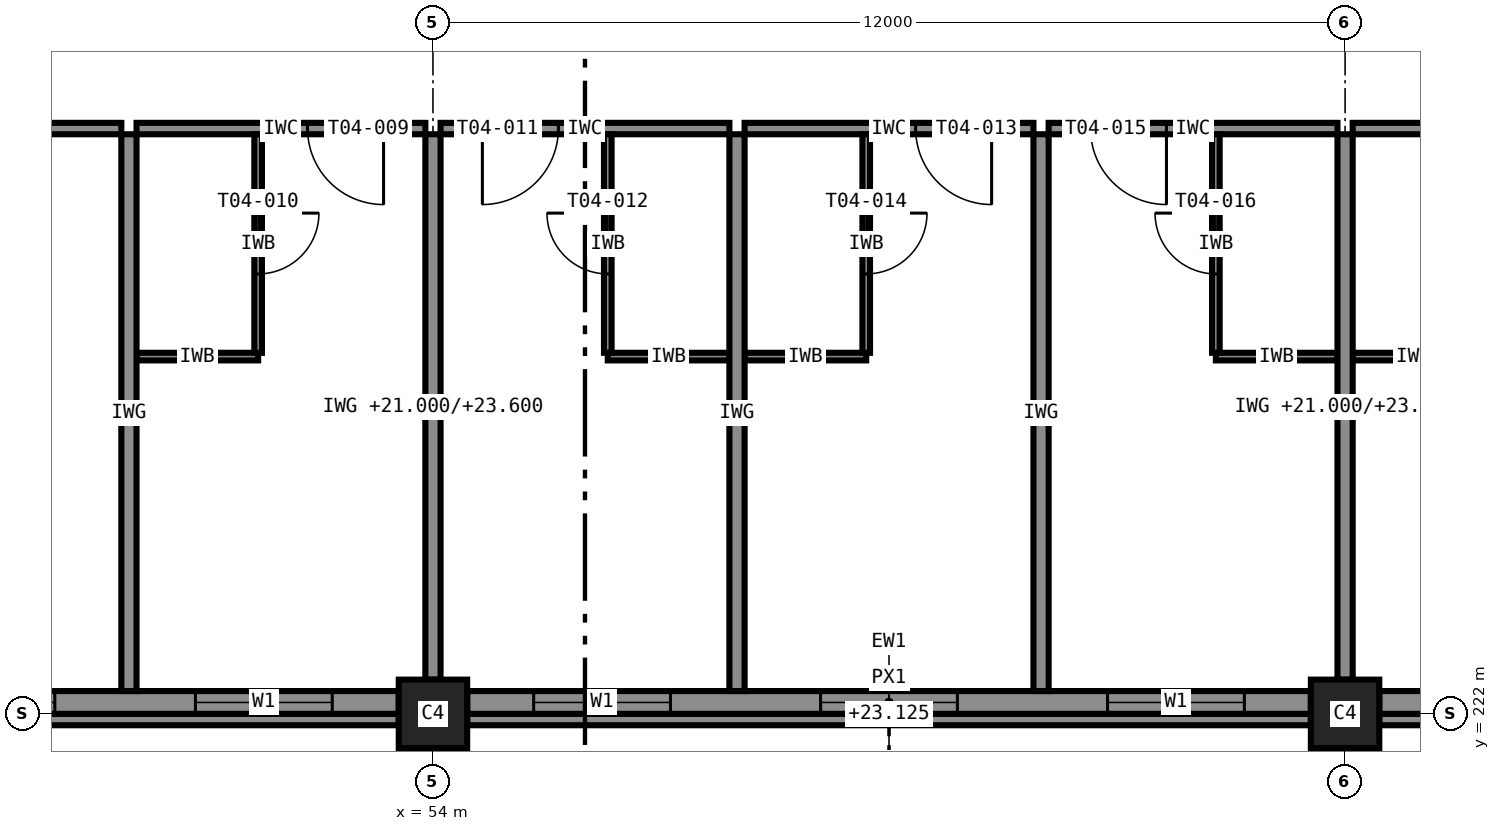
"""IFC4 building model, lengths in metres.
Left out: names, types, materials, properties, quantities, classifications, styles, units other than length and angle.
Written with IfcOpenShell. Run it as: python <this file> out.ifc"""

import sys

from ifc_helpers import new_model, si_unit, direction, frame, frame_2d, origin, origin_2d, place, context, subcontext, project, spatial, rectangle, extrude, element, fill, save


model = new_model("IFC4")
c1 = context("Model", 3, precision=1e-05, world=origin(), true_north=direction((0.0, 1.0)))
c2 = subcontext(c1, "Body", "Model", "MODEL_VIEW")
j1 = project(units=[si_unit("LENGTHUNIT", "METRE"), si_unit("PLANEANGLEUNIT", "RADIAN")], contexts=[c1])
p1 = place(None, origin())
s1 = spatial("IfcSite", under=j1, at=p1, CompositionType="ELEMENT")
p2 = place(p1, origin())
s2 = spatial("IfcBuilding", under=s1, at=p2, CompositionType="ELEMENT")
p3 = place(p2, frame((0.0, 0.0, 21.0)))
s3 = spatial("IfcBuildingStorey", under=s2, at=p3, CompositionType="ELEMENT", Elevation=21.0)
for number, where, z_axis, x_axis in (
    (1, (54.0, 222.0, 0.0), (0.0, 0.0, 1.0), (1.0, 0.0, 0.0)),
    (2, (66.0, 222.0, 0.0), (0.0, 0.0, 1.0), (1.0, 0.0, 0.0)),
):
    element("IfcColumn", number, at=place(p3, frame(where, z_axis=z_axis, x_axis=x_axis)), inside=s3, PredefinedType="COLUMN", context=c2, shape_type="SweptSolid", body=[
        extrude(rectangle(XDim=0.9, YDim=0.9, at=origin_2d()), origin(), (0.0, 0.0, 1.0), 3.6),
    ])
p4 = place(p3, frame((42.45, 222.15, 0.0), z_axis=(0.0, 0.0, 1.0), x_axis=(1.0, 0.0, 0.0)))
e3 = element("IfcWall", 3, at=p4, inside=s3, PredefinedType="STANDARD", context=c2, shape_type="SweptSolid", body=[
    extrude(rectangle(XDim=11.1, YDim=0.3, at=frame_2d((5.55, 0.0))), origin(), (0.0, 0.0, 1.0), 2.6),
])
p5 = place(p4, frame((1.025, 0.0, 0.85)))
e4 = element("IfcOpeningElement", 4, at=p5, cuts=e3, PredefinedType="OPENING", context=c2, shape_type="SweptSolid", body=[
    extrude(rectangle(XDim=1.8, YDim=1.75, at=frame_2d((0.9, 0.875))), frame((0.0, 0.16, 0.0), z_axis=(0.0, -1.0, 0.0), x_axis=(1.0, 0.0, 0.0)), (0.0, 0.0, 1.0), 0.32),
])
p6 = place(p4, frame((4.775, 0.0, 0.85)))
e5 = element("IfcOpeningElement", 5, at=p6, cuts=e3, PredefinedType="OPENING", context=c2, shape_type="SweptSolid", body=[
    extrude(rectangle(XDim=1.8, YDim=1.75, at=frame_2d((0.9, 0.875))), frame((0.0, 0.16, 0.0), z_axis=(0.0, -1.0, 0.0), x_axis=(1.0, 0.0, 0.0)), (0.0, 0.0, 1.0), 0.32),
])
p7 = place(p4, frame((8.425, 0.0, 0.85)))
e6 = element("IfcOpeningElement", 6, at=p7, cuts=e3, PredefinedType="OPENING", context=c2, shape_type="SweptSolid", body=[
    extrude(rectangle(XDim=1.8, YDim=1.75, at=frame_2d((0.9, 0.875))), frame((0.0, 0.16, 0.0), z_axis=(0.0, -1.0, 0.0), x_axis=(1.0, 0.0, 0.0)), (0.0, 0.0, 1.0), 0.32),
])
p8 = place(p3, frame((54.45, 222.15, 0.0), z_axis=(0.0, 0.0, 1.0), x_axis=(1.0, 0.0, 0.0)))
e7 = element("IfcWall", 7, at=p8, inside=s3, PredefinedType="STANDARD", context=c2, shape_type="SweptSolid", body=[
    extrude(rectangle(XDim=11.1, YDim=0.3, at=frame_2d((5.55, 0.0))), origin(), (0.0, 0.0, 1.0), 2.6),
])
p9 = place(p8, frame((0.875, 0.0, 0.85)))
e8 = element("IfcOpeningElement", 8, at=p9, cuts=e7, PredefinedType="OPENING", context=c2, shape_type="SweptSolid", body=[
    extrude(rectangle(XDim=1.8, YDim=1.75, at=frame_2d((0.9, 0.875))), frame((0.0, 0.16, 0.0), z_axis=(0.0, -1.0, 0.0), x_axis=(1.0, 0.0, 0.0)), (0.0, 0.0, 1.0), 0.32),
])
p10 = place(p8, frame((4.65, 0.0, 0.85)))
e9 = element("IfcOpeningElement", 9, at=p10, cuts=e7, PredefinedType="OPENING", context=c2, shape_type="SweptSolid", body=[
    extrude(rectangle(XDim=1.8, YDim=1.75, at=frame_2d((0.9, 0.875))), frame((0.0, 0.16, 0.0), z_axis=(0.0, -1.0, 0.0), x_axis=(1.0, 0.0, 0.0)), (0.0, 0.0, 1.0), 0.32),
])
p11 = place(p8, frame((8.425, 0.0, 0.85)))
e10 = element("IfcOpeningElement", 10, at=p11, cuts=e7, PredefinedType="OPENING", context=c2, shape_type="SweptSolid", body=[
    extrude(rectangle(XDim=1.8, YDim=1.75, at=frame_2d((0.9, 0.875))), frame((0.0, 0.16, 0.0), z_axis=(0.0, -1.0, 0.0), x_axis=(1.0, 0.0, 0.0)), (0.0, 0.0, 1.0), 0.32),
])
p12 = place(p3, frame((66.45, 222.15, 0.0), z_axis=(0.0, 0.0, 1.0), x_axis=(1.0, 0.0, 0.0)))
e11 = element("IfcWall", 11, at=p12, inside=s3, PredefinedType="STANDARD", context=c2, shape_type="SweptSolid", body=[
    extrude(rectangle(XDim=11.1, YDim=0.3, at=frame_2d((5.55, 0.0))), origin(), (0.0, 0.0, 1.0), 2.6),
])
p13 = place(p12, frame((0.875, 0.0, 0.85)))
e12 = element("IfcOpeningElement", 12, at=p13, cuts=e11, PredefinedType="OPENING", context=c2, shape_type="SweptSolid", body=[
    extrude(rectangle(XDim=1.8, YDim=1.75, at=frame_2d((0.9, 0.875))), frame((0.0, 0.16, 0.0), z_axis=(0.0, -1.0, 0.0), x_axis=(1.0, 0.0, 0.0)), (0.0, 0.0, 1.0), 0.32),
])
p14 = place(p12, frame((4.65, 0.0, 0.85)))
e13 = element("IfcOpeningElement", 13, at=p14, cuts=e11, PredefinedType="OPENING", context=c2, shape_type="SweptSolid", body=[
    extrude(rectangle(XDim=1.8, YDim=1.75, at=frame_2d((0.9, 0.875))), frame((0.0, 0.16, 0.0), z_axis=(0.0, -1.0, 0.0), x_axis=(1.0, 0.0, 0.0)), (0.0, 0.0, 1.0), 0.32),
])
p15 = place(p12, frame((8.425, 0.0, 0.85)))
e14 = element("IfcOpeningElement", 14, at=p15, cuts=e11, PredefinedType="OPENING", context=c2, shape_type="SweptSolid", body=[
    extrude(rectangle(XDim=1.8, YDim=1.75, at=frame_2d((0.9, 0.875))), frame((0.0, 0.16, 0.0), z_axis=(0.0, -1.0, 0.0), x_axis=(1.0, 0.0, 0.0)), (0.0, 0.0, 1.0), 0.32),
])
for number, where, z_axis, x_axis in (
    (15, (42.45, 221.925, 3.4), (0.0, 0.0, 1.0), (1.0, 0.0, 0.0)),
    (16, (54.45, 221.925, 3.4), (0.0, 0.0, 1.0), (1.0, 0.0, 0.0)),
    (17, (66.45, 221.925, 3.4), (0.0, 0.0, 1.0), (1.0, 0.0, 0.0)),
):
    element("IfcWall", number, at=place(p3, frame(where, z_axis=z_axis, x_axis=x_axis)), inside=s3, PredefinedType="STANDARD", context=c2, shape_type="SweptSolid", body=[
        extrude(rectangle(XDim=11.1, YDim=0.15, at=frame_2d((5.55, 0.0))), origin(), (0.0, 0.0, 1.0), 0.2),
    ])
p16 = place(p3, frame((49.9, 229.7, 0.0), z_axis=(0.0, 0.0, 1.0), x_axis=(-1.0, 0.0, 0.0)))
e18 = element("IfcWall", 18, at=p16, inside=s3, PredefinedType="PARTITIONING", context=c2, shape_type="SweptSolid", body=[
    extrude(rectangle(XDim=7.7, YDim=0.15, at=frame_2d((3.85, 0.0))), origin(), (0.0, 0.0, 1.0), 3.4),
])
p17 = place(p16, frame((3.15, 0.0, 0.0)))
e19 = element("IfcOpeningElement", 19, at=p17, cuts=e18, PredefinedType="OPENING", context=c2, shape_type="SweptSolid", body=[
    extrude(rectangle(XDim=1.0, YDim=2.1, at=frame_2d((0.5, 1.05))), frame((0.0, 0.085, 0.0), z_axis=(0.0, -1.0, 0.0), x_axis=(1.0, 0.0, 0.0)), (0.0, 0.0, 1.0), 0.17),
])
p18 = place(p3, frame((53.9, 229.7, 0.0), z_axis=(0.0, 0.0, 1.0), x_axis=(-1.0, 0.0, 0.0)))
e20 = element("IfcWall", 20, at=p18, inside=s3, PredefinedType="PARTITIONING", context=c2, shape_type="SweptSolid", body=[
    extrude(rectangle(XDim=3.8, YDim=0.15, at=frame_2d((1.9, 0.0))), origin(), (0.0, 0.0, 1.0), 3.4),
])
p19 = place(p18, frame((0.55, 0.0, 0.0)))
e21 = element("IfcOpeningElement", 21, at=p19, cuts=e20, PredefinedType="OPENING", context=c2, shape_type="SweptSolid", body=[
    extrude(rectangle(XDim=1.0, YDim=2.1, at=frame_2d((0.5, 1.05))), frame((0.0, 0.085, 0.0), z_axis=(0.0, -1.0, 0.0), x_axis=(1.0, 0.0, 0.0)), (0.0, 0.0, 1.0), 0.17),
])
p20 = place(p3, frame((50.1, 226.7, 0.0), z_axis=(0.0, 0.0, 1.0), x_axis=(1.0, 0.0, 0.0)))
e22 = element("IfcWall", 22, at=p20, inside=s3, PredefinedType="PARTITIONING", context=c2, shape_type="SweptSolid", body=[
    extrude(rectangle(XDim=1.6, YDim=0.1, at=frame_2d((0.8, 0.0))), origin(), (0.0, 0.0, 1.0), 3.4),
])
p21 = place(p3, frame((51.7, 229.625, 0.0), z_axis=(0.0, 0.0, 1.0), x_axis=(0.0, -1.0, 0.0)))
e23 = element("IfcWall", 23, at=p21, inside=s3, PredefinedType="PARTITIONING", context=c2, shape_type="SweptSolid", body=[
    extrude(rectangle(XDim=2.875, YDim=0.1, at=frame_2d((1.438, 0.0))), origin(), (0.0, 0.0, 1.0), 3.4),
])
p22 = place(p21, frame((1.038, 0.0, 0.0)))
e24 = element("IfcOpeningElement", 24, at=p22, cuts=e23, PredefinedType="OPENING", context=c2, shape_type="SweptSolid", body=[
    extrude(rectangle(XDim=0.8, YDim=2.1, at=frame_2d((0.4, 1.05))), frame((0.0, 0.06, 0.0), z_axis=(0.0, -1.0, 0.0), x_axis=(1.0, 0.0, 0.0)), (0.0, 0.0, 1.0), 0.12),
])
p23 = place(p3, frame((57.9, 229.7, 0.0), z_axis=(0.0, 0.0, 1.0), x_axis=(-1.0, 0.0, 0.0)))
e25 = element("IfcWall", 25, at=p23, inside=s3, PredefinedType="PARTITIONING", context=c2, shape_type="SweptSolid", body=[
    extrude(rectangle(XDim=3.8, YDim=0.15, at=frame_2d((1.9, 0.0))), origin(), (0.0, 0.0, 1.0), 3.4),
])
p24 = place(p23, frame((2.25, 0.0, 0.0)))
e26 = element("IfcOpeningElement", 26, at=p24, cuts=e25, PredefinedType="OPENING", context=c2, shape_type="SweptSolid", body=[
    extrude(rectangle(XDim=1.0, YDim=2.1, at=frame_2d((0.5, 1.05))), frame((0.0, 0.085, 0.0), z_axis=(0.0, -1.0, 0.0), x_axis=(1.0, 0.0, 0.0)), (0.0, 0.0, 1.0), 0.17),
])
p25 = place(p3, frame((56.3, 226.7, 0.0), z_axis=(0.0, 0.0, 1.0), x_axis=(1.0, 0.0, 0.0)))
e27 = element("IfcWall", 27, at=p25, inside=s3, PredefinedType="PARTITIONING", context=c2, shape_type="SweptSolid", body=[
    extrude(rectangle(XDim=1.6, YDim=0.1, at=frame_2d((0.8, 0.0))), origin(), (0.0, 0.0, 1.0), 3.4),
])
p26 = place(p3, frame((56.3, 226.75, 0.0), z_axis=(0.0, 0.0, 1.0), x_axis=(0.0, 1.0, 0.0)))
e28 = element("IfcWall", 28, at=p26, inside=s3, PredefinedType="PARTITIONING", context=c2, shape_type="SweptSolid", body=[
    extrude(rectangle(XDim=2.875, YDim=0.1, at=frame_2d((1.438, 0.0))), origin(), (0.0, 0.0, 1.0), 3.4),
])
p27 = place(p26, frame((1.038, 0.0, 0.0)))
e29 = element("IfcOpeningElement", 29, at=p27, cuts=e28, PredefinedType="OPENING", context=c2, shape_type="SweptSolid", body=[
    extrude(rectangle(XDim=0.8, YDim=2.1, at=frame_2d((0.4, 1.05))), frame((0.0, 0.06, 0.0), z_axis=(0.0, -1.0, 0.0), x_axis=(1.0, 0.0, 0.0)), (0.0, 0.0, 1.0), 0.12),
])
p28 = place(p3, frame((61.9, 229.7, 0.0), z_axis=(0.0, 0.0, 1.0), x_axis=(-1.0, 0.0, 0.0)))
e30 = element("IfcWall", 30, at=p28, inside=s3, PredefinedType="PARTITIONING", context=c2, shape_type="SweptSolid", body=[
    extrude(rectangle(XDim=3.8, YDim=0.15, at=frame_2d((1.9, 0.0))), origin(), (0.0, 0.0, 1.0), 3.4),
])
p29 = place(p28, frame((0.55, 0.0, 0.0)))
e31 = element("IfcOpeningElement", 31, at=p29, cuts=e30, PredefinedType="OPENING", context=c2, shape_type="SweptSolid", body=[
    extrude(rectangle(XDim=1.0, YDim=2.1, at=frame_2d((0.5, 1.05))), frame((0.0, 0.085, 0.0), z_axis=(0.0, -1.0, 0.0), x_axis=(1.0, 0.0, 0.0)), (0.0, 0.0, 1.0), 0.17),
])
p30 = place(p3, frame((58.1, 226.7, 0.0), z_axis=(0.0, 0.0, 1.0), x_axis=(1.0, 0.0, 0.0)))
e32 = element("IfcWall", 32, at=p30, inside=s3, PredefinedType="PARTITIONING", context=c2, shape_type="SweptSolid", body=[
    extrude(rectangle(XDim=1.6, YDim=0.1, at=frame_2d((0.8, 0.0))), origin(), (0.0, 0.0, 1.0), 3.4),
])
p31 = place(p3, frame((59.7, 229.625, 0.0), z_axis=(0.0, 0.0, 1.0), x_axis=(0.0, -1.0, 0.0)))
e33 = element("IfcWall", 33, at=p31, inside=s3, PredefinedType="PARTITIONING", context=c2, shape_type="SweptSolid", body=[
    extrude(rectangle(XDim=2.875, YDim=0.1, at=frame_2d((1.438, 0.0))), origin(), (0.0, 0.0, 1.0), 3.4),
])
p32 = place(p31, frame((1.038, 0.0, 0.0)))
e34 = element("IfcOpeningElement", 34, at=p32, cuts=e33, PredefinedType="OPENING", context=c2, shape_type="SweptSolid", body=[
    extrude(rectangle(XDim=0.8, YDim=2.1, at=frame_2d((0.4, 1.05))), frame((0.0, 0.06, 0.0), z_axis=(0.0, -1.0, 0.0), x_axis=(1.0, 0.0, 0.0)), (0.0, 0.0, 1.0), 0.12),
])
p33 = place(p3, frame((65.9, 229.7, 0.0), z_axis=(0.0, 0.0, 1.0), x_axis=(-1.0, 0.0, 0.0)))
e35 = element("IfcWall", 35, at=p33, inside=s3, PredefinedType="PARTITIONING", context=c2, shape_type="SweptSolid", body=[
    extrude(rectangle(XDim=3.8, YDim=0.15, at=frame_2d((1.9, 0.0))), origin(), (0.0, 0.0, 1.0), 3.4),
])
p34 = place(p33, frame((2.25, 0.0, 0.0)))
e36 = element("IfcOpeningElement", 36, at=p34, cuts=e35, PredefinedType="OPENING", context=c2, shape_type="SweptSolid", body=[
    extrude(rectangle(XDim=1.0, YDim=2.1, at=frame_2d((0.5, 1.05))), frame((0.0, 0.085, 0.0), z_axis=(0.0, -1.0, 0.0), x_axis=(1.0, 0.0, 0.0)), (0.0, 0.0, 1.0), 0.17),
])
p35 = place(p3, frame((64.3, 226.7, 0.0), z_axis=(0.0, 0.0, 1.0), x_axis=(1.0, 0.0, 0.0)))
e37 = element("IfcWall", 37, at=p35, inside=s3, PredefinedType="PARTITIONING", context=c2, shape_type="SweptSolid", body=[
    extrude(rectangle(XDim=1.6, YDim=0.1, at=frame_2d((0.8, 0.0))), origin(), (0.0, 0.0, 1.0), 3.4),
])
p36 = place(p3, frame((64.3, 226.75, 0.0), z_axis=(0.0, 0.0, 1.0), x_axis=(0.0, 1.0, 0.0)))
e38 = element("IfcWall", 38, at=p36, inside=s3, PredefinedType="PARTITIONING", context=c2, shape_type="SweptSolid", body=[
    extrude(rectangle(XDim=2.875, YDim=0.1, at=frame_2d((1.438, 0.0))), origin(), (0.0, 0.0, 1.0), 3.4),
])
p37 = place(p36, frame((1.038, 0.0, 0.0)))
e39 = element("IfcOpeningElement", 39, at=p37, cuts=e38, PredefinedType="OPENING", context=c2, shape_type="SweptSolid", body=[
    extrude(rectangle(XDim=0.8, YDim=2.1, at=frame_2d((0.4, 1.05))), frame((0.0, 0.06, 0.0), z_axis=(0.0, -1.0, 0.0), x_axis=(1.0, 0.0, 0.0)), (0.0, 0.0, 1.0), 0.12),
])
p38 = place(p3, frame((69.9, 229.7, 0.0), z_axis=(0.0, 0.0, 1.0), x_axis=(-1.0, 0.0, 0.0)))
e40 = element("IfcWall", 40, at=p38, inside=s3, PredefinedType="PARTITIONING", context=c2, shape_type="SweptSolid", body=[
    extrude(rectangle(XDim=3.8, YDim=0.15, at=frame_2d((1.9, 0.0))), origin(), (0.0, 0.0, 1.0), 3.4),
])
p39 = place(p38, frame((0.55, 0.0, 0.0)))
e41 = element("IfcOpeningElement", 41, at=p39, cuts=e40, PredefinedType="OPENING", context=c2, shape_type="SweptSolid", body=[
    extrude(rectangle(XDim=1.0, YDim=2.1, at=frame_2d((0.5, 1.05))), frame((0.0, 0.085, 0.0), z_axis=(0.0, -1.0, 0.0), x_axis=(1.0, 0.0, 0.0)), (0.0, 0.0, 1.0), 0.17),
])
p40 = place(p3, frame((66.1, 226.7, 0.0), z_axis=(0.0, 0.0, 1.0), x_axis=(1.0, 0.0, 0.0)))
e42 = element("IfcWall", 42, at=p40, inside=s3, PredefinedType="PARTITIONING", context=c2, shape_type="SweptSolid", body=[
    extrude(rectangle(XDim=1.6, YDim=0.1, at=frame_2d((0.8, 0.0))), origin(), (0.0, 0.0, 1.0), 3.4),
])
p41 = place(p3, frame((50.0, 222.3, 0.0), z_axis=(0.0, 0.0, 1.0), x_axis=(0.0, 1.0, 0.0)))
e43 = element("IfcWall", 43, at=p41, inside=s3, PredefinedType="PARTITIONING", context=c2, shape_type="SweptSolid", body=[
    extrude(rectangle(XDim=7.325, YDim=0.2, at=frame_2d((3.663, 0.0))), origin(), (0.0, 0.0, 1.0), 3.4),
])
p42 = place(p3, frame((54.0, 222.45, 0.0), z_axis=(0.0, 0.0, 1.0), x_axis=(0.0, 1.0, 0.0)))
e44 = element("IfcWall", 44, at=p42, inside=s3, PredefinedType="PARTITIONING", context=c2, shape_type="SweptSolid", body=[
    extrude(rectangle(XDim=7.175, YDim=0.2, at=frame_2d((3.587, 0.0))), origin(), (0.0, 0.0, 1.0), 2.6),
])
for number, where, z_axis, x_axis in (
    (45, (58.0, 222.3, 0.0), (0.0, 0.0, 1.0), (0.0, 1.0, 0.0)),
    (46, (62.0, 222.3, 0.0), (0.0, 0.0, 1.0), (0.0, 1.0, 0.0)),
):
    element("IfcWall", number, at=place(p3, frame(where, z_axis=z_axis, x_axis=x_axis)), inside=s3, PredefinedType="PARTITIONING", context=c2, shape_type="SweptSolid", body=[
        extrude(rectangle(XDim=7.325, YDim=0.2, at=frame_2d((3.663, 0.0))), origin(), (0.0, 0.0, 1.0), 3.4),
    ])
p43 = place(p3, frame((66.0, 222.45, 0.0), z_axis=(0.0, 0.0, 1.0), x_axis=(0.0, 1.0, 0.0)))
e47 = element("IfcWall", 47, at=p43, inside=s3, PredefinedType="PARTITIONING", context=c2, shape_type="SweptSolid", body=[
    extrude(rectangle(XDim=7.175, YDim=0.2, at=frame_2d((3.587, 0.0))), origin(), (0.0, 0.0, 1.0), 2.6),
])
p44 = place(p6, origin())
e48 = element("IfcWindow", 48, at=p44, inside=s3, PartitioningType="SINGLE_PANEL", PredefinedType="WINDOW", context=c2, shape_type="SweptSolid", body=[
    extrude(rectangle(XDim=1.8, YDim=1.75, at=frame_2d((0.9, 0.875))), frame((0.0, 0.03, 0.0), z_axis=(0.0, -1.0, 0.0), x_axis=(1.0, 0.0, 0.0)), (0.0, 0.0, 1.0), 0.06),
])
fill(e5, e48)
p45 = place(p7, origin())
e49 = element("IfcWindow", 49, at=p45, inside=s3, PartitioningType="SINGLE_PANEL", PredefinedType="WINDOW", context=c2, shape_type="SweptSolid", body=[
    extrude(rectangle(XDim=1.8, YDim=1.75, at=frame_2d((0.9, 0.875))), frame((0.0, 0.03, 0.0), z_axis=(0.0, -1.0, 0.0), x_axis=(1.0, 0.0, 0.0)), (0.0, 0.0, 1.0), 0.06),
])
fill(e6, e49)
p46 = place(p9, origin())
e50 = element("IfcWindow", 50, at=p46, inside=s3, PartitioningType="SINGLE_PANEL", PredefinedType="WINDOW", context=c2, shape_type="SweptSolid", body=[
    extrude(rectangle(XDim=1.8, YDim=1.75, at=frame_2d((0.9, 0.875))), frame((0.0, 0.03, 0.0), z_axis=(0.0, -1.0, 0.0), x_axis=(1.0, 0.0, 0.0)), (0.0, 0.0, 1.0), 0.06),
])
fill(e8, e50)
p47 = place(p10, origin())
e51 = element("IfcWindow", 51, at=p47, inside=s3, PartitioningType="SINGLE_PANEL", PredefinedType="WINDOW", context=c2, shape_type="SweptSolid", body=[
    extrude(rectangle(XDim=1.8, YDim=1.75, at=frame_2d((0.9, 0.875))), frame((0.0, 0.03, 0.0), z_axis=(0.0, -1.0, 0.0), x_axis=(1.0, 0.0, 0.0)), (0.0, 0.0, 1.0), 0.06),
])
fill(e9, e51)
p48 = place(p11, origin())
e52 = element("IfcWindow", 52, at=p48, inside=s3, PartitioningType="SINGLE_PANEL", PredefinedType="WINDOW", context=c2, shape_type="SweptSolid", body=[
    extrude(rectangle(XDim=1.8, YDim=1.75, at=frame_2d((0.9, 0.875))), frame((0.0, 0.03, 0.0), z_axis=(0.0, -1.0, 0.0), x_axis=(1.0, 0.0, 0.0)), (0.0, 0.0, 1.0), 0.06),
])
fill(e10, e52)
p49 = place(p19, origin())
e53 = element("IfcDoor", 53, at=p49, inside=s3, OperationType="SINGLE_SWING_LEFT", PredefinedType="DOOR", context=c2, shape_type="SweptSolid", body=[
    extrude(rectangle(XDim=1.0, YDim=2.1, at=frame_2d((0.5, 1.05))), frame((0.0, 0.025, 0.0), z_axis=(0.0, -1.0, 0.0), x_axis=(1.0, 0.0, 0.0)), (0.0, 0.0, 1.0), 0.05),
])
fill(e21, e53)
p50 = place(p22, origin())
e54 = element("IfcDoor", 54, at=p50, inside=s3, OperationType="SINGLE_SWING_LEFT", PredefinedType="DOOR", context=c2, shape_type="SweptSolid", body=[
    extrude(rectangle(XDim=0.8, YDim=2.1, at=frame_2d((0.4, 1.05))), frame((0.0, 0.025, 0.0), z_axis=(0.0, -1.0, 0.0), x_axis=(1.0, 0.0, 0.0)), (0.0, 0.0, 1.0), 0.05),
])
fill(e24, e54)
p51 = place(p24, origin())
e55 = element("IfcDoor", 55, at=p51, inside=s3, OperationType="SINGLE_SWING_RIGHT", PredefinedType="DOOR", context=c2, shape_type="SweptSolid", body=[
    extrude(rectangle(XDim=1.0, YDim=2.1, at=frame_2d((0.5, 1.05))), frame((0.0, 0.025, 0.0), z_axis=(0.0, -1.0, 0.0), x_axis=(1.0, 0.0, 0.0)), (0.0, 0.0, 1.0), 0.05),
])
fill(e26, e55)
p52 = place(p27, origin())
e56 = element("IfcDoor", 56, at=p52, inside=s3, OperationType="SINGLE_SWING_RIGHT", PredefinedType="DOOR", context=c2, shape_type="SweptSolid", body=[
    extrude(rectangle(XDim=0.8, YDim=2.1, at=frame_2d((0.4, 1.05))), frame((0.0, 0.025, 0.0), z_axis=(0.0, -1.0, 0.0), x_axis=(1.0, 0.0, 0.0)), (0.0, 0.0, 1.0), 0.05),
])
fill(e29, e56)
p53 = place(p29, origin())
e57 = element("IfcDoor", 57, at=p53, inside=s3, OperationType="SINGLE_SWING_LEFT", PredefinedType="DOOR", context=c2, shape_type="SweptSolid", body=[
    extrude(rectangle(XDim=1.0, YDim=2.1, at=frame_2d((0.5, 1.05))), frame((0.0, 0.025, 0.0), z_axis=(0.0, -1.0, 0.0), x_axis=(1.0, 0.0, 0.0)), (0.0, 0.0, 1.0), 0.05),
])
fill(e31, e57)
p54 = place(p32, origin())
e58 = element("IfcDoor", 58, at=p54, inside=s3, OperationType="SINGLE_SWING_LEFT", PredefinedType="DOOR", context=c2, shape_type="SweptSolid", body=[
    extrude(rectangle(XDim=0.8, YDim=2.1, at=frame_2d((0.4, 1.05))), frame((0.0, 0.025, 0.0), z_axis=(0.0, -1.0, 0.0), x_axis=(1.0, 0.0, 0.0)), (0.0, 0.0, 1.0), 0.05),
])
fill(e34, e58)
p55 = place(p34, origin())
e59 = element("IfcDoor", 59, at=p55, inside=s3, OperationType="SINGLE_SWING_LEFT", PredefinedType="DOOR", context=c2, shape_type="SweptSolid", body=[
    extrude(rectangle(XDim=1.0, YDim=2.1, at=frame_2d((0.5, 1.05))), frame((0.0, 0.025, 0.0), z_axis=(0.0, -1.0, 0.0), x_axis=(1.0, 0.0, 0.0)), (0.0, 0.0, 1.0), 0.05),
])
fill(e36, e59)
p56 = place(p37, origin())
e60 = element("IfcDoor", 60, at=p56, inside=s3, OperationType="SINGLE_SWING_RIGHT", PredefinedType="DOOR", context=c2, shape_type="SweptSolid", body=[
    extrude(rectangle(XDim=0.8, YDim=2.1, at=frame_2d((0.4, 1.05))), frame((0.0, 0.025, 0.0), z_axis=(0.0, -1.0, 0.0), x_axis=(1.0, 0.0, 0.0)), (0.0, 0.0, 1.0), 0.05),
])
fill(e39, e60)
save(model, sys.argv[1])
